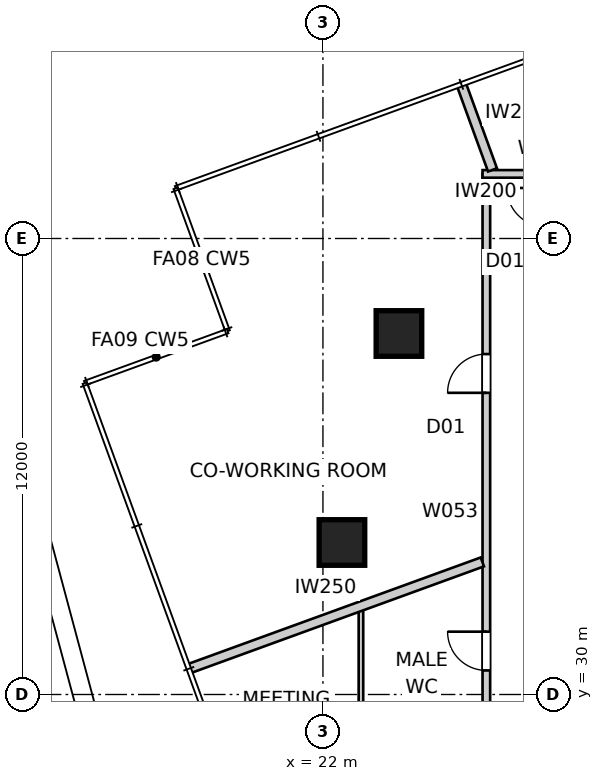
"""IFC4 building model, lengths in metres.
Left out: names, types, materials, properties, quantities, classifications, styles, units other than length and angle.
Written with IfcOpenShell. Run it as: python <this file> out.ifc"""

import sys

from ifc_helpers import new_model, si_unit, direction, frame, frame_2d, origin, origin_2d, place, context, subcontext, project, spatial, rectangle, extrude, element, fill, save


model = new_model("IFC4")
c1 = context("Model", 3, precision=1e-05, world=origin(), true_north=direction((0.0, 1.0)))
c2 = subcontext(c1, "Body", "Model", "MODEL_VIEW")
j1 = project(units=[si_unit("LENGTHUNIT", "METRE"), si_unit("PLANEANGLEUNIT", "RADIAN")], contexts=[c1])
p1 = place(None, origin())
s1 = spatial("IfcSite", under=j1, at=p1, CompositionType="ELEMENT")
p2 = place(p1, origin())
s2 = spatial("IfcBuilding", under=s1, at=p2, CompositionType="ELEMENT")
p3 = place(p2, frame((0.0, 0.0, 138.8)))
s3 = spatial("IfcBuildingStorey", under=s2, at=p3, CompositionType="ELEMENT", Elevation=138.8)
for number, where, z_axis, x_axis in (
    (1, (24.0, 39.5, 0.0), (0.0, 0.0, 1.0), (1.0, 0.0, 0.0)),
    (2, (22.5, 34.0, 0.0), (0.0, 0.0, 1.0), (1.0, 0.0, 0.0)),
):
    element("IfcColumn", number, at=place(p3, frame(where, z_axis=z_axis, x_axis=x_axis)), inside=s3, PredefinedType="COLUMN", context=c2, shape_type="SweptSolid", body=[
        extrude(rectangle(XDim=1.2, YDim=1.2, at=origin_2d()), origin(), (0.0, 0.0, 1.0), 5.0),
    ])
p4 = place(p3, frame((10.724, 40.628, -0.05), z_axis=(0.0, 0.0, 1.0), x_axis=(0.342020197341, -0.939692601126, 0.0)))
e3 = element("IfcWall", 3, at=p4, inside=s3, PredefinedType="PARAPET", context=c2, shape_type="SweptSolid", body=[
    extrude(rectangle(XDim=13.226, YDim=0.25, at=frame_2d((6.613, 0.0))), origin(), (0.0, 0.0, 1.0), 1.15),
])
p5 = place(p3, frame((26.3, 16.3, 0.0), z_axis=(0.0, 0.0, 1.0), x_axis=(0.0, 1.0, 0.0)))
e4 = element("IfcWall", 4, at=p5, inside=s3, PredefinedType="PARTITIONING", context=c2, shape_type="SweptSolid", body=[
    extrude(rectangle(XDim=27.4, YDim=0.2, at=frame_2d((13.7, 0.0))), origin(), (0.0, 0.0, 1.0), 4.85),
])
p6 = place(p5, frame((21.639, 0.0, 0.0)))
e5 = element("IfcOpeningElement", 5, at=p6, cuts=e4, PredefinedType="OPENING", context=c2, shape_type="SweptSolid", body=[
    extrude(rectangle(XDim=1.02, YDim=2.34, at=frame_2d((0.51, 1.17))), frame((0.0, 0.11, 0.0), z_axis=(0.0, -1.0, 0.0), x_axis=(1.0, 0.0, 0.0)), (0.0, 0.0, 1.0), 0.22),
])
p7 = place(p5, frame((3.312, 0.0, 0.0)))
e6 = element("IfcOpeningElement", 6, at=p7, cuts=e4, PredefinedType="OPENING", context=c2, shape_type="SweptSolid", body=[
    extrude(rectangle(XDim=1.02, YDim=2.34, at=frame_2d((0.51, 1.17))), frame((0.0, 0.11, 0.0), z_axis=(0.0, -1.0, 0.0), x_axis=(1.0, 0.0, 0.0)), (0.0, 0.0, 1.0), 0.22),
])
p8 = place(p5, frame((9.341, 0.0, 0.0)))
e7 = element("IfcOpeningElement", 7, at=p8, cuts=e4, PredefinedType="OPENING", context=c2, shape_type="SweptSolid", body=[
    extrude(rectangle(XDim=1.02, YDim=2.34, at=frame_2d((0.51, 1.17))), frame((0.0, 0.11, 0.0), z_axis=(0.0, -1.0, 0.0), x_axis=(1.0, 0.0, 0.0)), (0.0, 0.0, 1.0), 0.22),
])
p9 = place(p5, frame((14.333, 0.0, 0.0)))
e8 = element("IfcOpeningElement", 8, at=p9, cuts=e4, PredefinedType="OPENING", context=c2, shape_type="SweptSolid", body=[
    extrude(rectangle(XDim=1.02, YDim=2.34, at=frame_2d((0.51, 1.17))), frame((0.0, 0.11, 0.0), z_axis=(0.0, -1.0, 0.0), x_axis=(1.0, 0.0, 0.0)), (0.0, 0.0, 1.0), 0.22),
])
p10 = place(p3, frame((27.9, 43.7, 0.0), z_axis=(0.0, 0.0, 1.0), x_axis=(-1.0, 0.0, 0.0)))
e9 = element("IfcWall", 9, at=p10, inside=s3, PredefinedType="PARTITIONING", context=c2, shape_type="SweptSolid", body=[
    extrude(rectangle(XDim=1.7, YDim=0.2, at=frame_2d((0.85, 0.0))), origin(), (0.0, 0.0, 1.0), 4.85),
])
p11 = place(p3, frame((25.642, 46.058, 0.0), z_axis=(0.0, 0.0, 1.0), x_axis=(0.342021098348, -0.939692273186, 0.0)))
e10 = element("IfcWall", 10, at=p11, inside=s3, PredefinedType="PARTITIONING", context=c2, shape_type="SweptSolid", body=[
    extrude(rectangle(XDim=2.397, YDim=0.25, at=frame_2d((1.198, 0.0))), origin(), (0.0, 0.0, 1.0), 4.85),
])
p12 = place(p3, frame((18.47, 30.677, 0.0), z_axis=(0.0, 0.0, 1.0), x_axis=(0.939696268654, 0.342010120724, 0.0)))
e11 = element("IfcWall", 11, at=p12, inside=s3, PredefinedType="PARTITIONING", context=c2, shape_type="SweptSolid", body=[
    extrude(rectangle(XDim=8.221, YDim=0.25, at=frame_2d((4.11, 0.0))), origin(), (0.0, 0.0, 1.0), 4.85),
])
p13 = place(p3, frame((23.0, 18.271, 0.0), z_axis=(0.0, 0.0, 1.0), x_axis=(0.0, 1.0, 0.0)))
e12 = element("IfcWall", 12, at=p13, inside=s3, PredefinedType="PARTITIONING", context=c2, shape_type="SweptSolid", body=[
    extrude(rectangle(XDim=14.055, YDim=0.12, at=frame_2d((7.027, 0.0))), origin(), (0.0, 0.0, 1.0), 3.85),
])
p14 = place(p13, frame((2.912, 0.0, 0.0)))
e13 = element("IfcOpeningElement", 13, at=p14, cuts=e12, PredefinedType="OPENING", context=c2, shape_type="SweptSolid", body=[
    extrude(rectangle(XDim=0.96, YDim=2.1, at=frame_2d((0.48, 1.05))), frame((0.0, 0.07, 0.0), z_axis=(0.0, -1.0, 0.0), x_axis=(1.0, 0.0, 0.0)), (0.0, 0.0, 1.0), 0.14),
])
p15 = place(p6, origin())
e14 = element("IfcDoor", 14, at=p15, inside=s3, OperationType="SINGLE_SWING_LEFT", PredefinedType="DOOR", context=c2, shape_type="SweptSolid", body=[
    extrude(rectangle(XDim=1.02, YDim=2.34, at=frame_2d((0.51, 1.17))), frame((0.0, 0.025, 0.0), z_axis=(0.0, -1.0, 0.0), x_axis=(1.0, 0.0, 0.0)), (0.0, 0.0, 1.0), 0.05),
])
fill(e5, e14)
p16 = place(p9, origin())
e15 = element("IfcDoor", 15, at=p16, inside=s3, OperationType="SINGLE_SWING_RIGHT", PredefinedType="DOOR", context=c2, shape_type="SweptSolid", body=[
    extrude(rectangle(XDim=1.02, YDim=2.34, at=frame_2d((0.51, 1.17))), frame((0.0, 0.025, 0.0), z_axis=(0.0, -1.0, 0.0), x_axis=(1.0, 0.0, 0.0)), (0.0, 0.0, 1.0), 0.05),
])
fill(e8, e15)
save(model, sys.argv[1])
